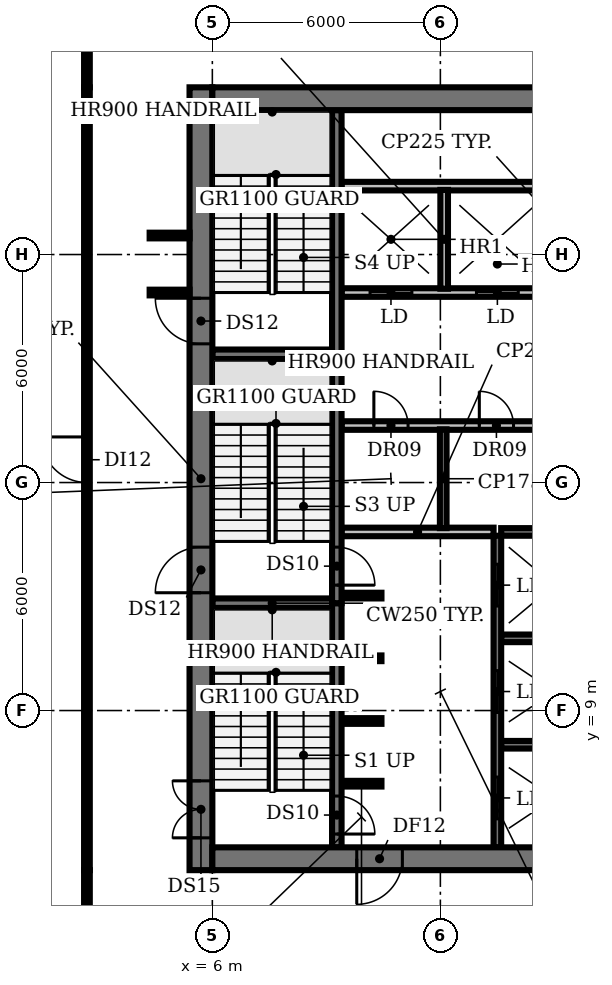
"""IFC4 building model, lengths in metres.
Left out: names, types, materials, properties, quantities, classifications, styles, units other than length and angle.
Written with IfcOpenShell. Run it as: python <this file> out.ifc"""

import sys

from ifc_helpers import new_model, si_unit, direction, frame, frame_2d, origin, place, context, subcontext, project, spatial, rectangle, extrude, element, fill, save


model = new_model("IFC4")
c1 = context("Model", 3, precision=1e-05, world=origin(), true_north=direction((0.0, 1.0)))
c2 = subcontext(c1, "Body", "Model", "MODEL_VIEW")
j1 = project(units=[si_unit("LENGTHUNIT", "METRE"), si_unit("PLANEANGLEUNIT", "RADIAN")], contexts=[c1])
p1 = place(None, origin())
s1 = spatial("IfcSite", under=j1, at=p1, CompositionType="ELEMENT")
p2 = place(p1, origin())
s2 = spatial("IfcBuilding", under=s1, at=p2, CompositionType="ELEMENT")
p3 = place(p2, frame((0.0, 0.0, 192.8)))
s3 = spatial("IfcBuildingStorey", under=s2, at=p3, CompositionType="ELEMENT", Elevation=192.8)
p4 = place(p3, frame((9.4, 7.075, 0.0), z_axis=(0.0, 0.0, 1.0), x_axis=(1.0, 0.0, 0.0)))
e1 = element("IfcWall", 1, at=p4, inside=s3, PredefinedType="SHEAR", context=c2, shape_type="SweptSolid", body=[
    extrude(rectangle(XDim=1.05, YDim=0.15, at=frame_2d((0.525, 0.0))), origin(), (0.0, 0.0, 1.0), 3.8),
])
p5 = place(p3, frame((13.6, 8.1, 0.0), z_axis=(0.0, 0.0, 1.0), x_axis=(1.0, 0.0, 0.0)))
e2 = element("IfcWall", 2, at=p5, inside=s3, PredefinedType="SHEAR", context=c2, shape_type="SweptSolid", body=[
    extrude(rectangle(XDim=2.8, YDim=0.2, at=frame_2d((1.4, 0.0))), origin(), (0.0, 0.0, 1.0), 3.8),
])
for number, where, z_axis, x_axis in (
    (3, (9.4, 8.725, 0.0), (0.0, 0.0, 1.0), (1.0, 0.0, 0.0)),
    (4, (9.4, 10.375, 0.0), (0.0, 0.0, 1.0), (1.0, 0.0, 0.0)),
):
    element("IfcWall", number, at=place(p3, frame(where, z_axis=z_axis, x_axis=x_axis)), inside=s3, PredefinedType="SHEAR", context=c2, shape_type="SweptSolid", body=[
        extrude(rectangle(XDim=1.05, YDim=0.15, at=frame_2d((0.525, 0.0))), origin(), (0.0, 0.0, 1.0), 3.8),
    ])
p6 = place(p3, frame((13.6, 10.9, 0.0), z_axis=(0.0, 0.0, 1.0), x_axis=(1.0, 0.0, 0.0)))
e5 = element("IfcWall", 5, at=p6, inside=s3, PredefinedType="SHEAR", context=c2, shape_type="SweptSolid", body=[
    extrude(rectangle(XDim=2.8, YDim=0.2, at=frame_2d((1.4, 0.0))), origin(), (0.0, 0.0, 1.0), 3.8),
])
p7 = place(p3, frame((6.0, 11.825, 0.0), z_axis=(0.0, 0.0, 1.0), x_axis=(1.0, 0.0, 0.0)))
e6 = element("IfcWall", 6, at=p7, inside=s3, PredefinedType="SHEAR", context=c2, shape_type="SweptSolid", body=[
    extrude(rectangle(XDim=3.15, YDim=0.25, at=frame_2d((1.575, 0.0))), origin(), (0.0, 0.0, 1.0), 3.8),
])
p8 = place(p3, frame((9.4, 12.025, 0.0), z_axis=(0.0, 0.0, 1.0), x_axis=(1.0, 0.0, 0.0)))
e7 = element("IfcWall", 7, at=p8, inside=s3, PredefinedType="SHEAR", context=c2, shape_type="SweptSolid", body=[
    extrude(rectangle(XDim=1.05, YDim=0.15, at=frame_2d((0.525, 0.0))), origin(), (0.0, 0.0, 1.0), 3.8),
])
p9 = place(p3, frame((9.4, 13.7, 0.0), z_axis=(0.0, 0.0, 1.0), x_axis=(1.0, 0.0, 0.0)))
e8 = element("IfcWall", 8, at=p9, inside=s3, PredefinedType="PARTITIONING", context=c2, shape_type="SweptSolid", body=[
    extrude(rectangle(XDim=4.0, YDim=0.225, at=frame_2d((2.0, 0.0))), origin(), (0.0, 0.0, 1.0), 3.8),
])
p10 = place(p3, frame((13.6, 13.7, 0.0), z_axis=(0.0, 0.0, 1.0), x_axis=(1.0, 0.0, 0.0)))
e9 = element("IfcWall", 9, at=p10, inside=s3, PredefinedType="SHEAR", context=c2, shape_type="SweptSolid", body=[
    extrude(rectangle(XDim=2.8, YDim=0.2, at=frame_2d((1.4, 0.0))), origin(), (0.0, 0.0, 1.0), 3.8),
])
p11 = place(p3, frame((9.4, 16.5, 0.0), z_axis=(0.0, 0.0, 1.0), x_axis=(1.0, 0.0, 0.0)))
e10 = element("IfcWall", 10, at=p11, inside=s3, PredefinedType="PARTITIONING", context=c2, shape_type="SweptSolid", body=[
    extrude(rectangle(XDim=14.6, YDim=0.225, at=frame_2d((7.3, 0.0))), origin(), (0.0, 0.0, 1.0), 3.8),
])
p12 = place(p11, frame((0.85, 0.0, 0.0)))
e11 = element("IfcOpeningElement", 11, at=p12, cuts=e10, PredefinedType="OPENING", context=c2, shape_type="SweptSolid", body=[
    extrude(rectangle(XDim=0.9, YDim=2.1, at=frame_2d((0.45, 1.05))), frame((0.0, 0.123, 0.0), z_axis=(0.0, -1.0, 0.0), x_axis=(1.0, 0.0, 0.0)), (0.0, 0.0, 1.0), 0.245),
])
p13 = place(p11, frame((3.625, 0.0, 0.0)))
e12 = element("IfcOpeningElement", 12, at=p13, cuts=e10, PredefinedType="OPENING", context=c2, shape_type="SweptSolid", body=[
    extrude(rectangle(XDim=0.9, YDim=2.1, at=frame_2d((0.45, 1.05))), frame((0.0, 0.123, 0.0), z_axis=(0.0, -1.0, 0.0), x_axis=(1.0, 0.0, 0.0)), (0.0, 0.0, 1.0), 0.245),
])
p14 = place(p11, frame((7.775, 0.0, 0.0)))
e13 = element("IfcOpeningElement", 13, at=p14, cuts=e10, PredefinedType="OPENING", context=c2, shape_type="SweptSolid", body=[
    extrude(rectangle(XDim=1.0, YDim=2.1, at=frame_2d((0.5, 1.05))), frame((0.0, 0.123, 0.0), z_axis=(0.0, -1.0, 0.0), x_axis=(1.0, 0.0, 0.0)), (0.0, 0.0, 1.0), 0.245),
])
p15 = place(p11, frame((12.4, 0.0, 0.0)))
e14 = element("IfcOpeningElement", 14, at=p15, cuts=e10, PredefinedType="OPENING", context=c2, shape_type="SweptSolid", body=[
    extrude(rectangle(XDim=1.0, YDim=2.1, at=frame_2d((0.5, 1.05))), frame((0.0, 0.123, 0.0), z_axis=(0.0, -1.0, 0.0), x_axis=(1.0, 0.0, 0.0)), (0.0, 0.0, 1.0), 0.245),
])
p16 = place(p3, frame((6.0, 18.375, 0.0), z_axis=(0.0, 0.0, 1.0), x_axis=(1.0, 0.0, 0.0)))
e15 = element("IfcWall", 15, at=p16, inside=s3, PredefinedType="SHEAR", context=c2, shape_type="SweptSolid", body=[
    extrude(rectangle(XDim=3.15, YDim=0.25, at=frame_2d((1.575, 0.0))), origin(), (0.0, 0.0, 1.0), 3.8),
])
p17 = place(p3, frame((24.0, 20.0, 0.0), z_axis=(0.0, 0.0, 1.0), x_axis=(-1.0, 0.0, 0.0)))
e16 = element("IfcWall", 16, at=p17, inside=s3, PredefinedType="PARTITIONING", context=c2, shape_type="SweptSolid", body=[
    extrude(rectangle(XDim=14.6, YDim=0.225, at=frame_2d((7.3, 0.0))), origin(), (0.0, 0.0, 1.0), 3.8),
])
p18 = place(p17, frame((12.75, 0.0, 0.0)))
e17 = element("IfcOpeningElement", 17, at=p18, cuts=e16, PredefinedType="OPENING", context=c2, shape_type="SweptSolid", body=[
    extrude(rectangle(XDim=1.1, YDim=2.1, at=frame_2d((0.55, 1.05))), frame((0.0, 0.123, 0.0), z_axis=(0.0, -1.0, 0.0), x_axis=(1.0, 0.0, 0.0)), (0.0, 0.0, 1.0), 0.245),
])
p19 = place(p17, frame((9.95, 0.0, 0.0)))
e18 = element("IfcOpeningElement", 18, at=p19, cuts=e16, PredefinedType="OPENING", context=c2, shape_type="SweptSolid", body=[
    extrude(rectangle(XDim=1.1, YDim=2.1, at=frame_2d((0.55, 1.05))), frame((0.0, 0.123, 0.0), z_axis=(0.0, -1.0, 0.0), x_axis=(1.0, 0.0, 0.0)), (0.0, 0.0, 1.0), 0.245),
])
p20 = place(p17, frame((7.15, 0.0, 0.0)))
e19 = element("IfcOpeningElement", 19, at=p20, cuts=e16, PredefinedType="OPENING", context=c2, shape_type="SweptSolid", body=[
    extrude(rectangle(XDim=1.1, YDim=2.1, at=frame_2d((0.55, 1.05))), frame((0.0, 0.123, 0.0), z_axis=(0.0, -1.0, 0.0), x_axis=(1.0, 0.0, 0.0)), (0.0, 0.0, 1.0), 0.245),
])
p21 = place(p17, frame((4.35, 0.0, 0.0)))
e20 = element("IfcOpeningElement", 20, at=p21, cuts=e16, PredefinedType="OPENING", context=c2, shape_type="SweptSolid", body=[
    extrude(rectangle(XDim=1.1, YDim=2.1, at=frame_2d((0.55, 1.05))), frame((0.0, 0.123, 0.0), z_axis=(0.0, -1.0, 0.0), x_axis=(1.0, 0.0, 0.0)), (0.0, 0.0, 1.0), 0.245),
])
p22 = place(p17, frame((1.2, 0.0, 0.0)))
e21 = element("IfcOpeningElement", 21, at=p22, cuts=e16, PredefinedType="OPENING", context=c2, shape_type="SweptSolid", body=[
    extrude(rectangle(XDim=1.0, YDim=2.1, at=frame_2d((0.5, 1.05))), frame((0.0, 0.123, 0.0), z_axis=(0.0, -1.0, 0.0), x_axis=(1.0, 0.0, 0.0)), (0.0, 0.0, 1.0), 0.245),
])
p23 = place(p3, frame((9.4, 22.8, 0.0), z_axis=(0.0, 0.0, 1.0), x_axis=(1.0, 0.0, 0.0)))
e22 = element("IfcWall", 22, at=p23, inside=s3, PredefinedType="PARTITIONING", context=c2, shape_type="SweptSolid", body=[
    extrude(rectangle(XDim=14.6, YDim=0.225, at=frame_2d((7.3, 0.0))), origin(), (0.0, 0.0, 1.0), 3.8),
])
p24 = place(p3, frame((9.275, 11.825, 0.0), z_axis=(0.0, 0.0, 1.0), x_axis=(0.0, -1.0, 0.0)))
e23 = element("IfcWall", 23, at=p24, inside=s3, PredefinedType="SHEAR", context=c2, shape_type="SweptSolid", body=[
    extrude(rectangle(XDim=6.425, YDim=0.25, at=frame_2d((3.212, 0.0))), origin(), (0.0, 0.0, 1.0), 3.8),
])
p25 = place(p24, frame((5.075, 0.0, 0.0)))
e24 = element("IfcOpeningElement", 24, at=p25, cuts=e23, PredefinedType="OPENING", context=c2, shape_type="SweptSolid", body=[
    extrude(rectangle(XDim=1.0, YDim=2.1, at=frame_2d((0.5, 1.05))), frame((0.0, 0.135, 0.0), z_axis=(0.0, -1.0, 0.0), x_axis=(1.0, 0.0, 0.0)), (0.0, 0.0, 1.0), 0.27),
])
p26 = place(p3, frame((9.275, 18.375, 0.0), z_axis=(0.0, 0.0, 1.0), x_axis=(0.0, -1.0, 0.0)))
e25 = element("IfcWall", 25, at=p26, inside=s3, PredefinedType="SHEAR", context=c2, shape_type="SweptSolid", body=[
    extrude(rectangle(XDim=6.55, YDim=0.25, at=frame_2d((3.275, 0.0))), origin(), (0.0, 0.0, 1.0), 3.8),
])
p27 = place(p26, frame((5.075, 0.0, 0.0)))
e26 = element("IfcOpeningElement", 26, at=p27, cuts=e25, PredefinedType="OPENING", context=c2, shape_type="SweptSolid", body=[
    extrude(rectangle(XDim=1.0, YDim=2.1, at=frame_2d((0.5, 1.05))), frame((0.0, 0.135, 0.0), z_axis=(0.0, -1.0, 0.0), x_axis=(1.0, 0.0, 0.0)), (0.0, 0.0, 1.0), 0.27),
])
p28 = place(p3, frame((9.275, 18.375, 0.0), z_axis=(0.0, 0.0, 1.0), x_axis=(0.0, 1.0, 0.0)))
e27 = element("IfcWall", 27, at=p28, inside=s3, PredefinedType="SHEAR", context=c2, shape_type="SweptSolid", body=[
    extrude(rectangle(XDim=6.425, YDim=0.25, at=frame_2d((3.212, 0.0))), origin(), (0.0, 0.0, 1.0), 3.8),
])
p29 = place(p3, frame((12.075, 13.8, 0.0), z_axis=(0.0, 0.0, 1.0), x_axis=(0.0, 1.0, 0.0)))
e28 = element("IfcWall", 28, at=p29, inside=s3, PredefinedType="PARTITIONING", context=c2, shape_type="SweptSolid", body=[
    extrude(rectangle(XDim=2.6, YDim=0.175, at=frame_2d((1.3, 0.0))), origin(), (0.0, 0.0, 1.0), 3.8),
])
p30 = place(p3, frame((12.1, 20.1, 0.0), z_axis=(0.0, 0.0, 1.0), x_axis=(0.0, 1.0, 0.0)))
e29 = element("IfcWall", 29, at=p30, inside=s3, PredefinedType="SOLIDWALL", context=c2, shape_type="SweptSolid", body=[
    extrude(rectangle(XDim=2.6, YDim=0.2, at=frame_2d((1.3, 0.0))), origin(), (0.0, 0.0, 1.0), 3.8),
])
p31 = place(p3, frame((13.5, 5.4, 0.0), z_axis=(0.0, 0.0, 1.0), x_axis=(0.0, 1.0, 0.0)))
e30 = element("IfcWall", 30, at=p31, inside=s3, PredefinedType="SHEAR", context=c2, shape_type="SweptSolid", body=[
    extrude(rectangle(XDim=8.2, YDim=0.2, at=frame_2d((4.1, 0.0))), origin(), (0.0, 0.0, 1.0), 3.8),
])
p32 = place(p31, frame((0.75, 0.0, 0.0)))
e31 = element("IfcOpeningElement", 31, at=p32, cuts=e30, PredefinedType="OPENING", context=c2, shape_type="SweptSolid", body=[
    extrude(rectangle(XDim=1.1, YDim=2.1, at=frame_2d((0.55, 1.05))), frame((0.0, 0.11, 0.0), z_axis=(0.0, -1.0, 0.0), x_axis=(1.0, 0.0, 0.0)), (0.0, 0.0, 1.0), 0.22),
])
p33 = place(p31, frame((3.55, 0.0, 0.0)))
e32 = element("IfcOpeningElement", 32, at=p33, cuts=e30, PredefinedType="OPENING", context=c2, shape_type="SweptSolid", body=[
    extrude(rectangle(XDim=1.1, YDim=2.1, at=frame_2d((0.55, 1.05))), frame((0.0, 0.11, 0.0), z_axis=(0.0, -1.0, 0.0), x_axis=(1.0, 0.0, 0.0)), (0.0, 0.0, 1.0), 0.22),
])
p34 = place(p31, frame((6.35, 0.0, 0.0)))
e33 = element("IfcOpeningElement", 33, at=p34, cuts=e30, PredefinedType="OPENING", context=c2, shape_type="SweptSolid", body=[
    extrude(rectangle(XDim=1.1, YDim=2.1, at=frame_2d((0.55, 1.05))), frame((0.0, 0.11, 0.0), z_axis=(0.0, -1.0, 0.0), x_axis=(1.0, 0.0, 0.0)), (0.0, 0.0, 1.0), 0.22),
])
p35 = place(p3, frame((5.7, 4.8, 0.0), z_axis=(0.0, 0.0, 1.0), x_axis=(0.0, 1.0, 0.0)))
e34 = element("IfcWall", 34, at=p35, inside=s3, PredefinedType="SHEAR", context=c2, shape_type="SweptSolid", body=[
    extrude(rectangle(XDim=20.6, YDim=0.6, at=frame_2d((10.3, 0.0))), origin(), (0.0, 0.0, 1.0), 3.8),
])
p36 = place(p35, frame((0.85, 0.0, 0.0)))
e35 = element("IfcOpeningElement", 35, at=p36, cuts=e34, PredefinedType="OPENING", context=c2, shape_type="SweptSolid", body=[
    extrude(rectangle(XDim=1.5, YDim=2.1, at=frame_2d((0.75, 1.05))), frame((0.0, 0.31, 0.0), z_axis=(0.0, -1.0, 0.0), x_axis=(1.0, 0.0, 0.0)), (0.0, 0.0, 1.0), 0.62),
])
p37 = place(p35, frame((7.3, 0.0, 0.0)))
e36 = element("IfcOpeningElement", 36, at=p37, cuts=e34, PredefinedType="OPENING", context=c2, shape_type="SweptSolid", body=[
    extrude(rectangle(XDim=1.2, YDim=2.1, at=frame_2d((0.6, 1.05))), frame((0.0, 0.31, 0.0), z_axis=(0.0, -1.0, 0.0), x_axis=(1.0, 0.0, 0.0)), (0.0, 0.0, 1.0), 0.62),
])
p38 = place(p35, frame((13.85, 0.0, 0.0)))
e37 = element("IfcOpeningElement", 37, at=p38, cuts=e34, PredefinedType="OPENING", context=c2, shape_type="SweptSolid", body=[
    extrude(rectangle(XDim=1.2, YDim=2.1, at=frame_2d((0.6, 1.05))), frame((0.0, 0.31, 0.0), z_axis=(0.0, -1.0, 0.0), x_axis=(1.0, 0.0, 0.0)), (0.0, 0.0, 1.0), 0.62),
])
p39 = place(p3, frame((24.0, 5.1, 0.0), z_axis=(0.0, 0.0, 1.0), x_axis=(-1.0, 0.0, 0.0)))
e38 = element("IfcWall", 38, at=p39, inside=s3, PredefinedType="SHEAR", context=c2, shape_type="SweptSolid", body=[
    extrude(rectangle(XDim=18.0, YDim=0.6, at=frame_2d((9.0, 0.0))), origin(), (0.0, 0.0, 1.0), 3.8),
])
p40 = place(p39, frame((13.0, 0.0, 0.0)))
e39 = element("IfcOpeningElement", 39, at=p40, cuts=e38, PredefinedType="OPENING", context=c2, shape_type="SweptSolid", body=[
    extrude(rectangle(XDim=1.2, YDim=2.1, at=frame_2d((0.6, 1.05))), frame((0.0, 0.31, 0.0), z_axis=(0.0, -1.0, 0.0), x_axis=(1.0, 0.0, 0.0)), (0.0, 0.0, 1.0), 0.62),
])
p41 = place(p39, frame((4.9, 0.0, 0.0)))
e40 = element("IfcOpeningElement", 40, at=p41, cuts=e38, PredefinedType="OPENING", context=c2, shape_type="SweptSolid", body=[
    extrude(rectangle(XDim=1.0, YDim=2.1, at=frame_2d((0.5, 1.05))), frame((0.0, 0.31, 0.0), z_axis=(0.0, -1.0, 0.0), x_axis=(1.0, 0.0, 0.0)), (0.0, 0.0, 1.0), 0.62),
])
p42 = place(p3, frame((6.0, 25.1, 0.0), z_axis=(0.0, 0.0, 1.0), x_axis=(1.0, 0.0, 0.0)))
e41 = element("IfcWall", 41, at=p42, inside=s3, PredefinedType="SHEAR", context=c2, shape_type="SweptSolid", body=[
    extrude(rectangle(XDim=18.0, YDim=0.6, at=frame_2d((9.0, 0.0))), origin(), (0.0, 0.0, 1.0), 3.8),
])
p43 = place(p3, frame((2.7, 0.9, 0.0), z_axis=(0.0, 0.0, 1.0), x_axis=(0.0, 1.0, 0.0)))
e42 = element("IfcWall", 42, at=p43, inside=s3, PredefinedType="PARTITIONING", context=c2, shape_type="SweptSolid", body=[
    extrude(rectangle(XDim=3.9, YDim=0.15, at=frame_2d((1.95, 0.0))), origin(), (0.0, 0.0, 1.0), 2.83),
])
p44 = place(p3, frame((2.7, 4.8, 0.0), z_axis=(0.0, 0.0, 1.0), x_axis=(0.0, 1.0, 0.0)))
e43 = element("IfcWall", 43, at=p44, inside=s3, PredefinedType="PARTITIONING", context=c2, shape_type="SweptSolid", body=[
    extrude(rectangle(XDim=20.6, YDim=0.15, at=frame_2d((10.3, 0.0))), origin(), (0.0, 0.0, 1.0), 2.83),
])
p45 = place(p44, frame((10.2, 0.0, 0.0)))
e44 = element("IfcOpeningElement", 44, at=p45, cuts=e43, PredefinedType="OPENING", context=c2, shape_type="SweptSolid", body=[
    extrude(rectangle(XDim=1.2, YDim=2.1, at=frame_2d((0.6, 1.05))), frame((0.0, 0.085, 0.0), z_axis=(0.0, -1.0, 0.0), x_axis=(1.0, 0.0, 0.0)), (0.0, 0.0, 1.0), 0.17),
])
p46 = place(p3, frame((2.7, 25.4, 0.0), z_axis=(0.0, 0.0, 1.0), x_axis=(0.0, 1.0, 0.0)))
e45 = element("IfcWall", 45, at=p46, inside=s3, PredefinedType="PARTITIONING", context=c2, shape_type="SweptSolid", body=[
    extrude(rectangle(XDim=3.9, YDim=0.15, at=frame_2d((1.95, 0.0))), origin(), (0.0, 0.0, 1.0), 2.83),
])
for number, where, z_axis, x_axis in (
    (46, (4.35, 20.0, 0.0), (0.0, 0.0, 1.0), (1.0, 0.0, 0.0)),
    (47, (4.35, 21.5, 0.0), (0.0, 0.0, 1.0), (1.0, 0.0, 0.0)),
):
    element("IfcWall", number, at=place(p3, frame(where, z_axis=z_axis, x_axis=x_axis)), inside=s3, PredefinedType="PARTITIONING", context=c2, shape_type="SweptSolid", body=[
        extrude(rectangle(XDim=1.05, YDim=0.15, at=frame_2d((0.525, 0.0))), origin(), (0.0, 0.0, 1.0), 2.83),
    ])
p47 = place(p12, origin())
e48 = element("IfcDoor", 48, at=p47, inside=s3, OperationType="SINGLE_SWING_LEFT", PredefinedType="DOOR", context=c2, shape_type="SweptSolid", body=[
    extrude(rectangle(XDim=0.9, YDim=2.1, at=frame_2d((0.45, 1.05))), frame((0.0, 0.025, 0.0), z_axis=(0.0, -1.0, 0.0), x_axis=(1.0, 0.0, 0.0)), (0.0, 0.0, 1.0), 0.05),
])
fill(e11, e48)
p48 = place(p13, origin())
e49 = element("IfcDoor", 49, at=p48, inside=s3, OperationType="SINGLE_SWING_LEFT", PredefinedType="DOOR", context=c2, shape_type="SweptSolid", body=[
    extrude(rectangle(XDim=0.9, YDim=2.1, at=frame_2d((0.45, 1.05))), frame((0.0, 0.025, 0.0), z_axis=(0.0, -1.0, 0.0), x_axis=(1.0, 0.0, 0.0)), (0.0, 0.0, 1.0), 0.05),
])
fill(e12, e49)
p49 = place(p18, origin())
e50 = element("IfcDoor", 50, at=p49, inside=s3, OperationType="DOUBLE_DOOR_SLIDING", PredefinedType="DOOR", context=c2, shape_type="SweptSolid", body=[
    extrude(rectangle(XDim=1.1, YDim=2.1, at=frame_2d((0.55, 1.05))), frame((0.0, 0.025, 0.0), z_axis=(0.0, -1.0, 0.0), x_axis=(1.0, 0.0, 0.0)), (0.0, 0.0, 1.0), 0.05),
])
fill(e17, e50)
p50 = place(p19, origin())
e51 = element("IfcDoor", 51, at=p50, inside=s3, OperationType="DOUBLE_DOOR_SLIDING", PredefinedType="DOOR", context=c2, shape_type="SweptSolid", body=[
    extrude(rectangle(XDim=1.1, YDim=2.1, at=frame_2d((0.55, 1.05))), frame((0.0, 0.025, 0.0), z_axis=(0.0, -1.0, 0.0), x_axis=(1.0, 0.0, 0.0)), (0.0, 0.0, 1.0), 0.05),
])
fill(e18, e51)
p51 = place(p25, origin())
e52 = element("IfcDoor", 52, at=p51, inside=s3, OperationType="SINGLE_SWING_RIGHT", PredefinedType="DOOR", context=c2, shape_type="SweptSolid", body=[
    extrude(rectangle(XDim=1.0, YDim=2.1, at=frame_2d((0.5, 1.05))), frame((0.0, 0.025, 0.0), z_axis=(0.0, -1.0, 0.0), x_axis=(1.0, 0.0, 0.0)), (0.0, 0.0, 1.0), 0.05),
])
fill(e24, e52)
p52 = place(p27, origin())
e53 = element("IfcDoor", 53, at=p52, inside=s3, OperationType="SINGLE_SWING_RIGHT", PredefinedType="DOOR", context=c2, shape_type="SweptSolid", body=[
    extrude(rectangle(XDim=1.0, YDim=2.1, at=frame_2d((0.5, 1.05))), frame((0.0, 0.025, 0.0), z_axis=(0.0, -1.0, 0.0), x_axis=(1.0, 0.0, 0.0)), (0.0, 0.0, 1.0), 0.05),
])
fill(e26, e53)
p53 = place(p32, origin())
e54 = element("IfcDoor", 54, at=p53, inside=s3, OperationType="DOUBLE_DOOR_SLIDING", PredefinedType="DOOR", context=c2, shape_type="SweptSolid", body=[
    extrude(rectangle(XDim=1.1, YDim=2.1, at=frame_2d((0.55, 1.05))), frame((0.0, 0.025, 0.0), z_axis=(0.0, -1.0, 0.0), x_axis=(1.0, 0.0, 0.0)), (0.0, 0.0, 1.0), 0.05),
])
fill(e31, e54)
p54 = place(p33, origin())
e55 = element("IfcDoor", 55, at=p54, inside=s3, OperationType="DOUBLE_DOOR_SLIDING", PredefinedType="DOOR", context=c2, shape_type="SweptSolid", body=[
    extrude(rectangle(XDim=1.1, YDim=2.1, at=frame_2d((0.55, 1.05))), frame((0.0, 0.025, 0.0), z_axis=(0.0, -1.0, 0.0), x_axis=(1.0, 0.0, 0.0)), (0.0, 0.0, 1.0), 0.05),
])
fill(e32, e55)
p55 = place(p34, origin())
e56 = element("IfcDoor", 56, at=p55, inside=s3, OperationType="DOUBLE_DOOR_SLIDING", PredefinedType="DOOR", context=c2, shape_type="SweptSolid", body=[
    extrude(rectangle(XDim=1.1, YDim=2.1, at=frame_2d((0.55, 1.05))), frame((0.0, 0.025, 0.0), z_axis=(0.0, -1.0, 0.0), x_axis=(1.0, 0.0, 0.0)), (0.0, 0.0, 1.0), 0.05),
])
fill(e33, e56)
p56 = place(p36, origin())
e57 = element("IfcDoor", 57, at=p56, inside=s3, OperationType="DOUBLE_DOOR_SINGLE_SWING", PredefinedType="DOOR", context=c2, shape_type="SweptSolid", body=[
    extrude(rectangle(XDim=1.5, YDim=2.1, at=frame_2d((0.75, 1.05))), frame((0.0, 0.025, 0.0), z_axis=(0.0, -1.0, 0.0), x_axis=(1.0, 0.0, 0.0)), (0.0, 0.0, 1.0), 0.05),
])
fill(e35, e57)
p57 = place(p37, origin())
e58 = element("IfcDoor", 58, at=p57, inside=s3, OperationType="SINGLE_SWING_LEFT", PredefinedType="DOOR", context=c2, shape_type="SweptSolid", body=[
    extrude(rectangle(XDim=1.2, YDim=2.1, at=frame_2d((0.6, 1.05))), frame((0.0, 0.025, 0.0), z_axis=(0.0, -1.0, 0.0), x_axis=(1.0, 0.0, 0.0)), (0.0, 0.0, 1.0), 0.05),
])
fill(e36, e58)
p58 = place(p38, origin())
e59 = element("IfcDoor", 59, at=p58, inside=s3, OperationType="SINGLE_SWING_RIGHT", PredefinedType="DOOR", context=c2, shape_type="SweptSolid", body=[
    extrude(rectangle(XDim=1.2, YDim=2.1, at=frame_2d((0.6, 1.05))), frame((0.0, 0.025, 0.0), z_axis=(0.0, -1.0, 0.0), x_axis=(1.0, 0.0, 0.0)), (0.0, 0.0, 1.0), 0.05),
])
fill(e37, e59)
p59 = place(p40, origin())
e60 = element("IfcDoor", 60, at=p59, inside=s3, OperationType="SINGLE_SWING_RIGHT", PredefinedType="DOOR", context=c2, shape_type="SweptSolid", body=[
    extrude(rectangle(XDim=1.2, YDim=2.1, at=frame_2d((0.6, 1.05))), frame((0.0, 0.025, 0.0), z_axis=(0.0, -1.0, 0.0), x_axis=(1.0, 0.0, 0.0)), (0.0, 0.0, 1.0), 0.05),
])
fill(e39, e60)
p60 = place(p45, origin())
e61 = element("IfcDoor", 61, at=p60, inside=s3, OperationType="SINGLE_SWING_RIGHT", PredefinedType="DOOR", context=c2, shape_type="SweptSolid", body=[
    extrude(rectangle(XDim=1.2, YDim=2.1, at=frame_2d((0.6, 1.05))), frame((0.0, 0.025, 0.0), z_axis=(0.0, -1.0, 0.0), x_axis=(1.0, 0.0, 0.0)), (0.0, 0.0, 1.0), 0.05),
])
fill(e44, e61)
save(model, sys.argv[1])
